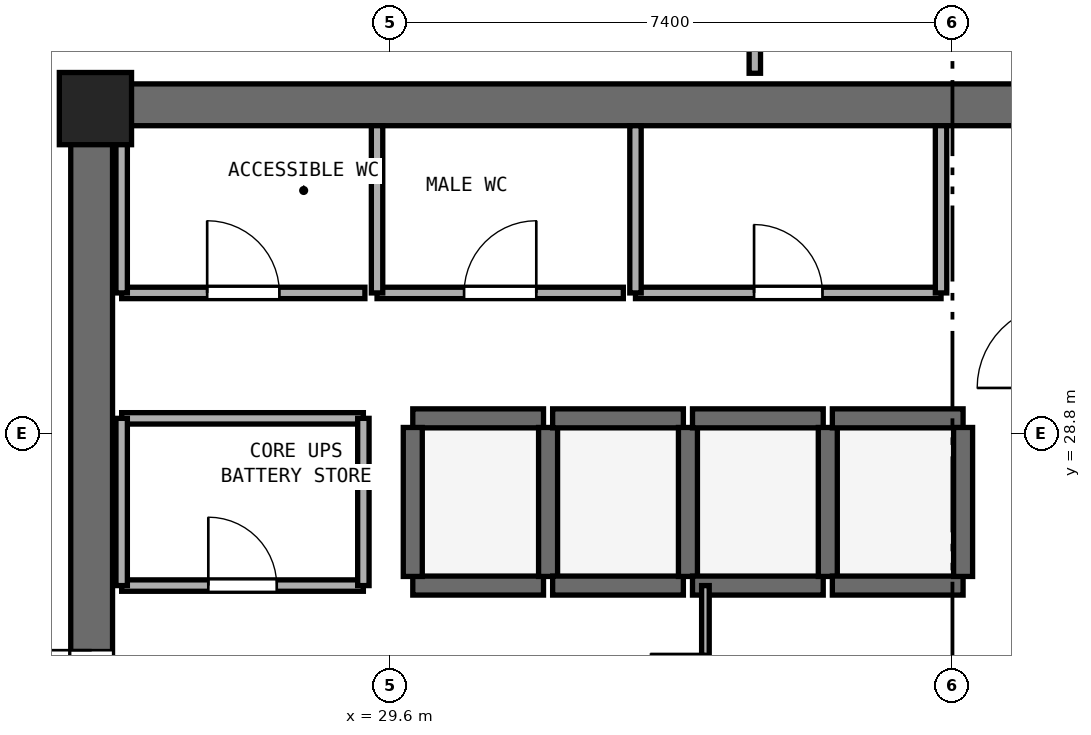
"""IFC4 building model, lengths in metres.
Left out: names, types, materials, properties, quantities, classifications, styles, units other than length and angle.
Written with IfcOpenShell. Run it as: python <this file> out.ifc"""

import sys

from ifc_helpers import new_model, si_unit, direction, frame, frame_2d, origin, origin_2d, place, context, subcontext, project, spatial, rectangle, extrude, element, fill, save


model = new_model("IFC4")
c1 = context("Model", 3, precision=1e-05, world=origin(), true_north=direction((0.0, 1.0)))
c2 = subcontext(c1, "Body", "Model", "MODEL_VIEW")
j1 = project(units=[si_unit("LENGTHUNIT", "METRE"), si_unit("PLANEANGLEUNIT", "RADIAN")], contexts=[c1])
p1 = place(None, origin())
s1 = spatial("IfcSite", under=j1, at=p1, CompositionType="ELEMENT")
p2 = place(p1, origin())
s2 = spatial("IfcBuilding", under=s1, at=p2, CompositionType="ELEMENT")
p3 = place(p2, frame((0.0, 0.0, 128.8)))
s3 = spatial("IfcBuildingStorey", under=s2, at=p3, CompositionType="ELEMENT", Elevation=128.8)
p4 = place(p3, frame((25.4, 33.125, 0.0), z_axis=(0.0, 0.0, 1.0), x_axis=(1.0, 0.0, 0.0)))
e1 = element("IfcWall", 1, at=p4, inside=s3, PredefinedType="SHEAR", context=c2, shape_type="SweptSolid", body=[
    extrude(rectangle(XDim=23.2, YDim=0.55, at=frame_2d((11.6, 0.0))), origin(), (0.0, 0.0, 1.0), 3.54),
])
p5 = place(p3, frame((25.675, 17.55, 0.0), z_axis=(0.0, 0.0, 1.0), x_axis=(0.0, 1.0, 0.0)))
e2 = element("IfcWall", 2, at=p5, inside=s3, PredefinedType="SHEAR", context=c2, shape_type="SweptSolid", body=[
    extrude(rectangle(XDim=15.3, YDim=0.55, at=frame_2d((7.65, 0.0))), origin(), (0.0, 0.0, 1.0), 3.54),
])
p6 = place(p5, frame((6.9, 0.0, 0.0)))
e3 = element("IfcOpeningElement", 3, at=p6, cuts=e2, PredefinedType="OPENING", context=c2, shape_type="SweptSolid", body=[
    extrude(rectangle(XDim=1.5, YDim=2.15, at=frame_2d((0.75, 1.075))), frame((0.0, 0.285, 0.0), z_axis=(0.0, -1.0, 0.0), x_axis=(1.0, 0.0, 0.0)), (0.0, 0.0, 1.0), 0.57),
])
p7 = place(p3, frame((25.725, 33.075, 0.0), z_axis=(0.0, 0.0, 1.0), x_axis=(1.0, 0.0, 0.0)))
e4 = element("IfcColumn", 4, at=p7, inside=s3, PredefinedType="PILASTER", context=c2, shape_type="SweptSolid", body=[
    extrude(rectangle(XDim=0.95, YDim=0.95, at=origin_2d()), origin(), (0.0, 0.0, 1.0), 3.8),
])
for number, where, z_axis, x_axis in (
    (5, (29.9, 26.8, 0.0), (0.0, 0.0, 1.0), (1.0, 0.0, 0.0)),
    (6, (29.9, 29.0, 0.0), (0.0, 0.0, 1.0), (1.0, 0.0, 0.0)),
):
    element("IfcWall", number, at=place(p3, frame(where, z_axis=z_axis, x_axis=x_axis)), inside=s3, PredefinedType="SHEAR", context=c2, shape_type="SweptSolid", body=[
        extrude(rectangle(XDim=1.72, YDim=0.25, at=frame_2d((0.86, 0.0))), origin(), (0.0, 0.0, 1.0), 3.54),
    ])
for number, where, z_axis, x_axis in (
    (7, (29.9, 26.92, 0.0), (0.0, 0.0, 1.0), (0.0, 1.0, 0.0)),
    (8, (31.68, 26.92, 0.0), (0.0, 0.0, 1.0), (0.0, 1.0, 0.0)),
):
    element("IfcWall", number, at=place(p3, frame(where, z_axis=z_axis, x_axis=x_axis)), inside=s3, PredefinedType="SHEAR", context=c2, shape_type="SweptSolid", body=[
        extrude(rectangle(XDim=1.96, YDim=0.25, at=frame_2d((0.98, 0.0))), origin(), (0.0, 0.0, 1.0), 3.54),
    ])
for number, where, z_axis, x_axis in (
    (9, (31.74, 26.8, 0.0), (0.0, 0.0, 1.0), (1.0, 0.0, 0.0)),
    (10, (31.74, 29.0, 0.0), (0.0, 0.0, 1.0), (1.0, 0.0, 0.0)),
):
    element("IfcWall", number, at=place(p3, frame(where, z_axis=z_axis, x_axis=x_axis)), inside=s3, PredefinedType="SHEAR", context=c2, shape_type="SweptSolid", body=[
        extrude(rectangle(XDim=1.72, YDim=0.25, at=frame_2d((0.86, 0.0))), origin(), (0.0, 0.0, 1.0), 3.54),
    ])
p8 = place(p3, frame((33.52, 26.92, 0.0), z_axis=(0.0, 0.0, 1.0), x_axis=(0.0, 1.0, 0.0)))
e11 = element("IfcWall", 11, at=p8, inside=s3, PredefinedType="SHEAR", context=c2, shape_type="SweptSolid", body=[
    extrude(rectangle(XDim=1.96, YDim=0.25, at=frame_2d((0.98, 0.0))), origin(), (0.0, 0.0, 1.0), 3.54),
])
for number, where, z_axis, x_axis in (
    (12, (33.58, 26.8, 0.0), (0.0, 0.0, 1.0), (1.0, 0.0, 0.0)),
    (13, (33.58, 29.0, 0.0), (0.0, 0.0, 1.0), (1.0, 0.0, 0.0)),
):
    element("IfcWall", number, at=place(p3, frame(where, z_axis=z_axis, x_axis=x_axis)), inside=s3, PredefinedType="SHEAR", context=c2, shape_type="SweptSolid", body=[
        extrude(rectangle(XDim=1.72, YDim=0.25, at=frame_2d((0.86, 0.0))), origin(), (0.0, 0.0, 1.0), 3.54),
    ])
p9 = place(p3, frame((35.36, 26.92, 0.0), z_axis=(0.0, 0.0, 1.0), x_axis=(0.0, 1.0, 0.0)))
e14 = element("IfcWall", 14, at=p9, inside=s3, PredefinedType="SHEAR", context=c2, shape_type="SweptSolid", body=[
    extrude(rectangle(XDim=1.96, YDim=0.25, at=frame_2d((0.98, 0.0))), origin(), (0.0, 0.0, 1.0), 3.54),
])
for number, where, z_axis, x_axis in (
    (15, (35.42, 26.8, 0.0), (0.0, 0.0, 1.0), (1.0, 0.0, 0.0)),
    (16, (35.42, 29.0, 0.0), (0.0, 0.0, 1.0), (1.0, 0.0, 0.0)),
):
    element("IfcWall", number, at=place(p3, frame(where, z_axis=z_axis, x_axis=x_axis)), inside=s3, PredefinedType="SHEAR", context=c2, shape_type="SweptSolid", body=[
        extrude(rectangle(XDim=1.72, YDim=0.25, at=frame_2d((0.86, 0.0))), origin(), (0.0, 0.0, 1.0), 3.54),
    ])
p10 = place(p3, frame((37.14, 26.92, 0.0), z_axis=(0.0, 0.0, 1.0), x_axis=(0.0, 1.0, 0.0)))
e17 = element("IfcWall", 17, at=p10, inside=s3, PredefinedType="SHEAR", context=c2, shape_type="SweptSolid", body=[
    extrude(rectangle(XDim=1.96, YDim=0.25, at=frame_2d((0.98, 0.0))), origin(), (0.0, 0.0, 1.0), 3.54),
])
p11 = place(p3, frame((26.07, 30.65, 0.0), z_axis=(0.0, 0.0, 1.0), x_axis=(1.0, 0.0, 0.0)))
e18 = element("IfcWall", 18, at=p11, inside=s3, PredefinedType="PARTITIONING", context=c2, shape_type="SweptSolid", body=[
    extrude(rectangle(XDim=3.2, YDim=0.15, at=frame_2d((1.6, 0.0))), origin(), (0.0, 0.0, 1.0), 3.54),
])
p12 = place(p11, frame((1.125, 0.0, 0.0)))
e19 = element("IfcOpeningElement", 19, at=p12, cuts=e18, PredefinedType="OPENING", context=c2, shape_type="SweptSolid", body=[
    extrude(rectangle(XDim=0.95, YDim=2.1, at=frame_2d((0.475, 1.05))), frame((0.0, 0.085, 0.0), z_axis=(0.0, -1.0, 0.0), x_axis=(1.0, 0.0, 0.0)), (0.0, 0.0, 1.0), 0.17),
])
p13 = place(p3, frame((26.07, 30.65, 0.0), z_axis=(0.0, 0.0, 1.0), x_axis=(0.0, 1.0, 0.0)))
e20 = element("IfcWall", 20, at=p13, inside=s3, PredefinedType="PARTITIONING", context=c2, shape_type="SweptSolid", body=[
    extrude(rectangle(XDim=2.2, YDim=0.15, at=frame_2d((1.1, 0.0))), origin(), (0.0, 0.0, 1.0), 2.64),
])
p14 = place(p3, frame((29.43, 30.65, 0.0), z_axis=(0.0, 0.0, 1.0), x_axis=(1.0, 0.0, 0.0)))
e21 = element("IfcWall", 21, at=p14, inside=s3, PredefinedType="PARTITIONING", context=c2, shape_type="SweptSolid", body=[
    extrude(rectangle(XDim=3.24, YDim=0.15, at=frame_2d((1.62, 0.0))), origin(), (0.0, 0.0, 1.0), 3.54),
])
p15 = place(p14, frame((1.145, 0.0, 0.0)))
e22 = element("IfcOpeningElement", 22, at=p15, cuts=e21, PredefinedType="OPENING", context=c2, shape_type="SweptSolid", body=[
    extrude(rectangle(XDim=0.95, YDim=2.1, at=frame_2d((0.475, 1.05))), frame((0.0, 0.085, 0.0), z_axis=(0.0, -1.0, 0.0), x_axis=(1.0, 0.0, 0.0)), (0.0, 0.0, 1.0), 0.17),
])
p16 = place(p3, frame((29.43, 30.65, 0.0), z_axis=(0.0, 0.0, 1.0), x_axis=(0.0, 1.0, 0.0)))
e23 = element("IfcWall", 23, at=p16, inside=s3, PredefinedType="PARTITIONING", context=c2, shape_type="SweptSolid", body=[
    extrude(rectangle(XDim=2.2, YDim=0.15, at=frame_2d((1.1, 0.0))), origin(), (0.0, 0.0, 1.0), 3.54),
])
p17 = place(p3, frame((32.83, 30.65, 0.0), z_axis=(0.0, 0.0, 1.0), x_axis=(1.0, 0.0, 0.0)))
e24 = element("IfcWall", 24, at=p17, inside=s3, PredefinedType="PARTITIONING", context=c2, shape_type="SweptSolid", body=[
    extrude(rectangle(XDim=4.02, YDim=0.15, at=frame_2d((2.01, 0.0))), origin(), (0.0, 0.0, 1.0), 3.54),
])
p18 = place(p17, frame((1.56, 0.0, 0.0)))
e25 = element("IfcOpeningElement", 25, at=p18, cuts=e24, PredefinedType="OPENING", context=c2, shape_type="SweptSolid", body=[
    extrude(rectangle(XDim=0.9, YDim=2.1, at=frame_2d((0.45, 1.05))), frame((0.0, 0.085, 0.0), z_axis=(0.0, -1.0, 0.0), x_axis=(1.0, 0.0, 0.0)), (0.0, 0.0, 1.0), 0.17),
])
for number, where, z_axis, x_axis in (
    (26, (32.83, 30.65, 0.0), (0.0, 0.0, 1.0), (0.0, 1.0, 0.0)),
    (27, (36.85, 30.65, 0.0), (0.0, 0.0, 1.0), (0.0, 1.0, 0.0)),
):
    element("IfcWall", number, at=place(p3, frame(where, z_axis=z_axis, x_axis=x_axis)), inside=s3, PredefinedType="PARTITIONING", context=c2, shape_type="SweptSolid", body=[
        extrude(rectangle(XDim=2.2, YDim=0.15, at=frame_2d((1.1, 0.0))), origin(), (0.0, 0.0, 1.0), 3.54),
    ])
p19 = place(p3, frame((26.07, 26.8, 0.0), z_axis=(0.0, 0.0, 1.0), x_axis=(1.0, 0.0, 0.0)))
e28 = element("IfcWall", 28, at=p19, inside=s3, PredefinedType="PARTITIONING", context=c2, shape_type="SweptSolid", body=[
    extrude(rectangle(XDim=3.18, YDim=0.15, at=frame_2d((1.59, 0.0))), origin(), (0.0, 0.0, 1.0), 3.54),
])
p20 = place(p19, frame((1.14, 0.0, 0.0)))
e29 = element("IfcOpeningElement", 29, at=p20, cuts=e28, PredefinedType="OPENING", context=c2, shape_type="SweptSolid", body=[
    extrude(rectangle(XDim=0.9, YDim=2.1, at=frame_2d((0.45, 1.05))), frame((0.0, 0.085, 0.0), z_axis=(0.0, -1.0, 0.0), x_axis=(1.0, 0.0, 0.0)), (0.0, 0.0, 1.0), 0.17),
])
p21 = place(p3, frame((26.07, 29.0, 0.0), z_axis=(0.0, 0.0, 1.0), x_axis=(1.0, 0.0, 0.0)))
e30 = element("IfcWall", 30, at=p21, inside=s3, PredefinedType="PARTITIONING", context=c2, shape_type="SweptSolid", body=[
    extrude(rectangle(XDim=3.18, YDim=0.15, at=frame_2d((1.59, 0.0))), origin(), (0.0, 0.0, 1.0), 3.54),
])
p22 = place(p3, frame((26.07, 26.8, 0.0), z_axis=(0.0, 0.0, 1.0), x_axis=(0.0, 1.0, 0.0)))
e31 = element("IfcWall", 31, at=p22, inside=s3, PredefinedType="PARTITIONING", context=c2, shape_type="SweptSolid", body=[
    extrude(rectangle(XDim=2.2, YDim=0.15, at=frame_2d((1.1, 0.0))), origin(), (0.0, 0.0, 1.0), 2.64),
])
p23 = place(p3, frame((29.25, 26.8, 0.0), z_axis=(0.0, 0.0, 1.0), x_axis=(0.0, 1.0, 0.0)))
e32 = element("IfcWall", 32, at=p23, inside=s3, PredefinedType="PARTITIONING", context=c2, shape_type="SweptSolid", body=[
    extrude(rectangle(XDim=2.2, YDim=0.15, at=frame_2d((1.1, 0.0))), origin(), (0.0, 0.0, 1.0), 3.54),
])
p24 = place(p3, frame((33.75, 23.6, 0.0), z_axis=(0.0, 0.0, 1.0), x_axis=(0.0, 1.0, 0.0)))
e33 = element("IfcWall", 33, at=p24, inside=s3, PredefinedType="PARTITIONING", context=c2, shape_type="SweptSolid", body=[
    extrude(rectangle(XDim=3.2, YDim=0.1, at=frame_2d((1.6, 0.0))), origin(), (0.0, 0.0, 1.0), 3.54),
])
p25 = place(p24, frame((0.85, 0.0, 0.0)))
e34 = element("IfcOpeningElement", 34, at=p25, cuts=e33, PredefinedType="OPENING", context=c2, shape_type="SweptSolid", body=[
    extrude(rectangle(XDim=1.45, YDim=2.12, at=frame_2d((0.725, 1.06))), frame((0.0, 0.06, 0.0), z_axis=(0.0, -1.0, 0.0), x_axis=(1.0, 0.0, 0.0)), (0.0, 0.0, 1.0), 0.12),
])
p26 = place(p3, frame((34.4, 33.54, 0.0), z_axis=(0.0, 0.0, 1.0), x_axis=(0.0, 1.0, 0.0)))
e35 = element("IfcWall", 35, at=p26, inside=s3, PredefinedType="PARTITIONING", context=c2, shape_type="SweptSolid", body=[
    extrude(rectangle(XDim=2.41, YDim=0.15, at=frame_2d((1.205, 0.0))), origin(), (0.0, 0.0, 1.0), 3.54),
])
p27 = place(p6, origin())
e36 = element("IfcDoor", 36, at=p27, inside=s3, OperationType="DOUBLE_DOOR_SINGLE_SWING", PredefinedType="DOOR", context=c2, shape_type="SweptSolid", body=[
    extrude(rectangle(XDim=1.5, YDim=2.15, at=frame_2d((0.75, 1.075))), frame((0.0, 0.025, 0.0), z_axis=(0.0, -1.0, 0.0), x_axis=(1.0, 0.0, 0.0)), (0.0, 0.0, 1.0), 0.05),
])
fill(e3, e36)
p28 = place(p12, origin())
e37 = element("IfcDoor", 37, at=p28, inside=s3, OperationType="SINGLE_SWING_LEFT", PredefinedType="DOOR", context=c2, shape_type="SweptSolid", body=[
    extrude(rectangle(XDim=0.95, YDim=2.1, at=frame_2d((0.475, 1.05))), frame((0.0, 0.025, 0.0), z_axis=(0.0, -1.0, 0.0), x_axis=(1.0, 0.0, 0.0)), (0.0, 0.0, 1.0), 0.05),
])
fill(e19, e37)
p29 = place(p15, origin())
e38 = element("IfcDoor", 38, at=p29, inside=s3, OperationType="SINGLE_SWING_RIGHT", PredefinedType="DOOR", context=c2, shape_type="SweptSolid", body=[
    extrude(rectangle(XDim=0.95, YDim=2.1, at=frame_2d((0.475, 1.05))), frame((0.0, 0.025, 0.0), z_axis=(0.0, -1.0, 0.0), x_axis=(1.0, 0.0, 0.0)), (0.0, 0.0, 1.0), 0.05),
])
fill(e22, e38)
p30 = place(p18, origin())
e39 = element("IfcDoor", 39, at=p30, inside=s3, OperationType="SINGLE_SWING_LEFT", PredefinedType="DOOR", context=c2, shape_type="SweptSolid", body=[
    extrude(rectangle(XDim=0.9, YDim=2.1, at=frame_2d((0.45, 1.05))), frame((0.0, 0.025, 0.0), z_axis=(0.0, -1.0, 0.0), x_axis=(1.0, 0.0, 0.0)), (0.0, 0.0, 1.0), 0.05),
])
fill(e25, e39)
p31 = place(p20, origin())
e40 = element("IfcDoor", 40, at=p31, inside=s3, OperationType="SINGLE_SWING_LEFT", PredefinedType="DOOR", context=c2, shape_type="SweptSolid", body=[
    extrude(rectangle(XDim=0.9, YDim=2.1, at=frame_2d((0.45, 1.05))), frame((0.0, 0.025, 0.0), z_axis=(0.0, -1.0, 0.0), x_axis=(1.0, 0.0, 0.0)), (0.0, 0.0, 1.0), 0.05),
])
fill(e29, e40)
p32 = place(p25, origin())
e41 = element("IfcDoor", 41, at=p32, inside=s3, OperationType="DOUBLE_DOOR_SINGLE_SWING", PredefinedType="DOOR", context=c2, shape_type="SweptSolid", body=[
    extrude(rectangle(XDim=1.45, YDim=2.12, at=frame_2d((0.725, 1.06))), frame((0.0, 0.025, 0.0), z_axis=(0.0, -1.0, 0.0), x_axis=(1.0, 0.0, 0.0)), (0.0, 0.0, 1.0), 0.05),
])
fill(e34, e41)
save(model, sys.argv[1])
